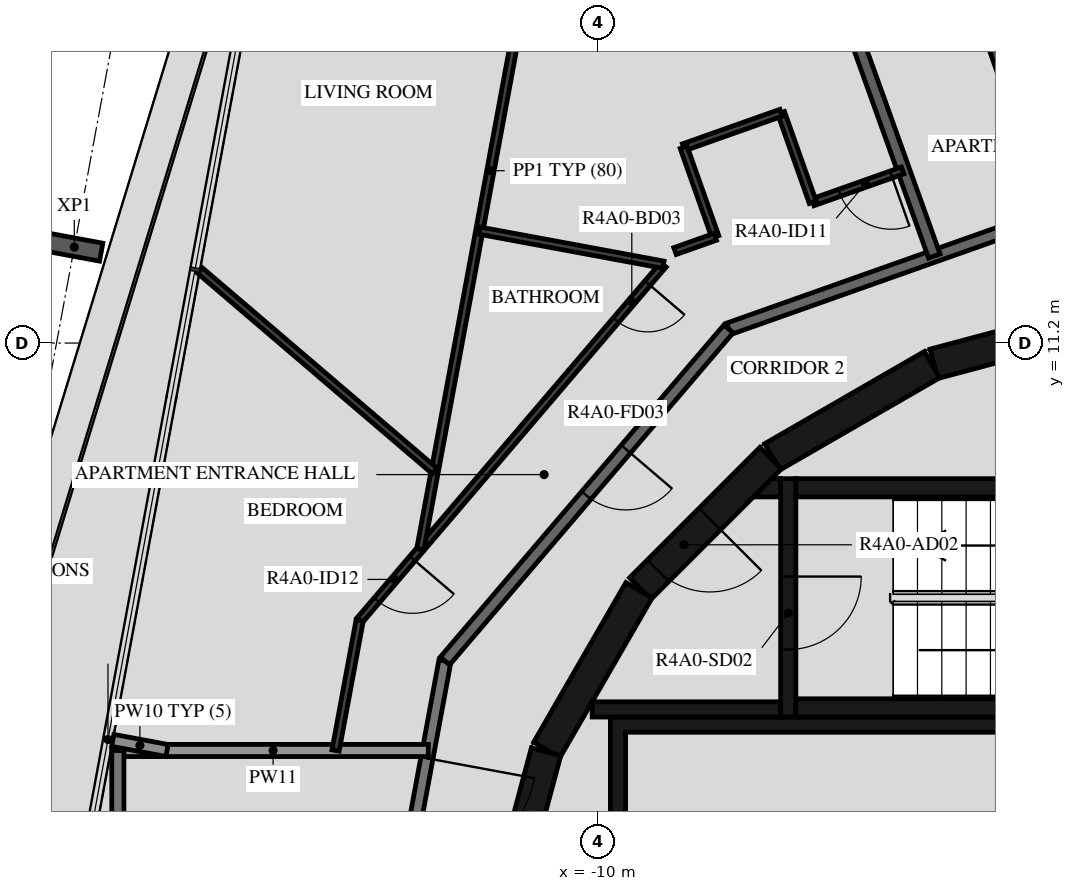
"""IFC4 building model, lengths in metres.
Left out: names, types, materials, properties, quantities, classifications, styles, units other than length and angle.
Written with IfcOpenShell. Run it as: python <this file> out.ifc"""

import sys

from ifc_helpers import new_model, si_unit, direction, frame, frame_2d, origin, origin_2d, place, context, subcontext, project, spatial, polyline, rectangle, i_section, outline, extrude, element, fill, save


model = new_model("IFC4")
c1 = context("Model", 3, precision=1e-05, world=origin(), true_north=direction((0.0, 1.0)))
c2 = subcontext(c1, "Body", "Model", "MODEL_VIEW")
j1 = project(units=[si_unit("LENGTHUNIT", "METRE"), si_unit("PLANEANGLEUNIT", "RADIAN")], contexts=[c1])
p1 = place(None, origin())
s1 = spatial("IfcSite", under=j1, at=p1, CompositionType="ELEMENT")
p2 = place(p1, origin())
s2 = spatial("IfcBuilding", under=s1, at=p2, CompositionType="ELEMENT")
p3 = place(p2, frame((0.0, 0.0, 151.7)))
s3 = spatial("IfcBuildingStorey", under=s2, at=p3, CompositionType="ELEMENT", Elevation=151.7)
p4 = place(p3, frame((-18.616, 12.777, -0.45), z_axis=(0.0, 0.0, 1.0), x_axis=(0.182235967681, 0.983254825609, 0.0)))
e1 = element("IfcColumn", 1, at=p4, inside=s3, PredefinedType="COLUMN", context=c2, shape_type="SweptSolid", body=[
    extrude(i_section(OverallWidth=0.3, OverallDepth=0.9, WebThickness=0.019, FlangeThickness=0.035, FilletRadius=0.03, at=origin_2d()), origin(), (0.0, 0.0, 1.0), 3.57),
])
for number, where, z_axis, x_axis in (
    (2, (-1.55, 11.643, 0.0), (0.0, 0.0, 1.0), (-0.966, -0.259, 0.0)),
    (3, (-4.51, 10.845, 0.0), (0.0, 0.0, 1.0), (-0.866, -0.5, 0.0)),
):
    element("IfcWall", number, at=place(p3, frame(where, z_axis=z_axis, x_axis=x_axis)), inside=s3, PredefinedType="SHEAR", context=c2, shape_type="SweptSolid", body=[
        extrude(rectangle(XDim=3.033, YDim=0.5, at=frame_2d((1.516, 0.0))), origin(), (0.0, 0.0, 1.0), 3.12),
    ])
p5 = place(p3, frame((-7.164, 9.308, 0.0), z_axis=(0.0, 0.0, 1.0), x_axis=(-0.707106781187, -0.707106781187, 0.0)))
e4 = element("IfcWall", 4, at=p5, inside=s3, PredefinedType="SHEAR", context=c2, shape_type="SweptSolid", body=[
    extrude(rectangle(XDim=3.032, YDim=0.5, at=frame_2d((1.516, 0.0))), origin(), (0.0, 0.0, 1.0), 3.12),
])
p6 = place(p5, frame((1.416, 0.0, 0.0)))
e5 = element("IfcOpeningElement", 5, at=p6, cuts=e4, PredefinedType="OPENING", context=c2, shape_type="SweptSolid", body=[
    extrude(rectangle(XDim=1.2, YDim=2.1, at=frame_2d((0.6, 1.05))), frame((0.0, 0.26, 0.0), z_axis=(0.0, -1.0, 0.0), x_axis=(1.0, 0.0, 0.0)), (0.0, 0.0, 1.0), 0.52),
])
for number, where, z_axis, x_axis in (
    (6, (-9.329, 7.137, 0.0), (0.0, 0.0, 1.0), (-0.5, -0.866, 0.0)),
    (7, (-10.858, 4.479, 0.0), (0.0, 0.0, 1.0), (-0.259, -0.966, 0.0)),
):
    element("IfcWall", number, at=place(p3, frame(where, z_axis=z_axis, x_axis=x_axis)), inside=s3, PredefinedType="SHEAR", context=c2, shape_type="SweptSolid", body=[
        extrude(rectangle(XDim=3.033, YDim=0.5, at=frame_2d((1.516, 0.0))), origin(), (0.0, 0.0, 1.0), 3.12),
    ])
for number, where, z_axis, x_axis in (
    (8, (-6.75, 5.2, 0.0), (0.0, 0.0, 1.0), (1.0, 0.0, 0.0)),
    (9, (-6.75, 8.82, 0.0), (0.0, 0.0, 1.0), (1.0, 0.0, 0.0)),
):
    element("IfcWall", number, at=place(p3, frame(where, z_axis=z_axis, x_axis=x_axis)), inside=s3, PredefinedType="SHEAR", context=c2, shape_type="SweptSolid", body=[
        extrude(rectangle(XDim=6.75, YDim=0.3, at=frame_2d((3.375, 0.0))), origin(), (0.0, 0.0, 1.0), 3.12),
    ])
p7 = place(p3, frame((-6.875, 8.97, 0.0), z_axis=(0.0, 0.0, 1.0), x_axis=(0.0, -1.0, 0.0)))
e10 = element("IfcWall", 10, at=p7, inside=s3, PredefinedType="SHEAR", context=c2, shape_type="SweptSolid", body=[
    extrude(rectangle(XDim=3.92, YDim=0.25, at=frame_2d((1.96, 0.0))), origin(), (0.0, 0.0, 1.0), 3.12),
])
p8 = place(p7, frame((1.61, 0.0, 0.0)))
e11 = element("IfcOpeningElement", 11, at=p8, cuts=e10, PredefinedType="OPENING", context=c2, shape_type="SweptSolid", body=[
    extrude(rectangle(XDim=1.2, YDim=2.1, at=frame_2d((0.6, 1.05))), frame((0.0, 0.135, 0.0), z_axis=(0.0, -1.0, 0.0), x_axis=(1.0, 0.0, 0.0)), (0.0, 0.0, 1.0), 0.27),
])
p9 = place(p3, frame((-7.0, 5.175, 0.0), z_axis=(0.0, 0.0, 1.0), x_axis=(-1.0, 0.0, 0.0)))
e12 = element("IfcWall", 12, at=p9, inside=s3, PredefinedType="SHEAR", context=c2, shape_type="SweptSolid", body=[
    extrude(rectangle(XDim=3.1, YDim=0.25, at=frame_2d((1.55, 0.0))), origin(), (0.0, 0.0, 1.0), 3.12),
])
p10 = place(p3, origin())
e13 = element("IfcWall", 13, at=p10, inside=s3, PredefinedType="SHEAR", context=c2, shape_type="SweptSolid", body=[
    extrude(outline(polyline([(-7.148, 8.97), (-7.0, 8.97), (-7.0, 8.67), (-7.448, 8.67), (-7.148, 8.97)])), origin(), (0.0, 0.0, 1.0), 3.12),
])
p11 = place(p3, origin())
e14 = element("IfcWall", 14, at=p11, inside=s3, PredefinedType="SHEAR", context=c2, shape_type="SweptSolid", body=[
    extrude(outline(polyline([(-9.55, 4.8), (-1.2, 4.8), (-1.2, 1.9), (-0.95, 1.9), (-0.95, 4.8), (0.95, 4.8), (0.95, 1.9), (1.2, 1.9), (1.2, 4.8), (3.1, 4.8), (3.1, 1.9), (3.35, 1.9), (3.35, 4.8), (5.25, 4.8), (5.25, 1.9), (5.5, 1.9), (5.5, 4.8), (7.4, 4.8), (7.4, 1.9), (7.65, 1.9), (7.65, 4.8), (9.55, 4.8), (9.55, 1.9), (9.8, 1.9), (9.8, 4.8), (9.8, 5.05), (-9.8, 5.05), (-9.8, 4.8), (-9.8, 1.9), (-9.55, 1.9), (-9.55, 4.8)])), origin(), (0.0, 0.0, 1.0), 3.12),
])
p12 = place(p3, frame((-12.521, 5.972, 0.0), z_axis=(0.0, 0.0, 1.0), x_axis=(-0.182251559718, -0.983251935661, 0.0)))
e15 = element("IfcWall", 15, at=p12, inside=s3, PredefinedType="STANDARD", context=c2, shape_type="SweptSolid", body=[
    extrude(rectangle(XDim=5.117, YDim=0.2, at=frame_2d((2.559, 0.0))), origin(), (0.0, 0.0, 1.0), 3.12),
])
p13 = place(p12, frame((1.627, 0.0, 0.0)))
e16 = element("IfcOpeningElement", 16, at=p13, cuts=e15, PredefinedType="OPENING", context=c2, shape_type="SweptSolid", body=[
    extrude(rectangle(XDim=1.8, YDim=2.1, at=frame_2d((0.9, 1.05))), frame((0.0, 0.11, 0.0), z_axis=(0.0, -1.0, 0.0), x_axis=(1.0, 0.0, 0.0)), (0.0, 0.0, 1.0), 0.22),
])
p14 = place(p3, frame((-2.359, 13.38, 0.0), z_axis=(0.0, 0.0, 1.0), x_axis=(-0.942647529236, -0.333789807551, 0.0)))
e17 = element("IfcWall", 17, at=p14, inside=s3, PredefinedType="STANDARD", context=c2, shape_type="SweptSolid", body=[
    extrude(rectangle(XDim=5.833, YDim=0.2, at=frame_2d((2.917, 0.0))), origin(), (0.0, 0.0, 1.0), 3.12),
])
p15 = place(p3, frame((-7.858, 11.433, 0.0), z_axis=(0.0, 0.0, 1.0), x_axis=(-0.649440801937, -0.760412154545, 0.0)))
e18 = element("IfcWall", 18, at=p15, inside=s3, PredefinedType="STANDARD", context=c2, shape_type="SweptSolid", body=[
    extrude(rectangle(XDim=7.181, YDim=0.2, at=frame_2d((3.59, 0.0))), origin(), (0.0, 0.0, 1.0), 3.12),
])
p16 = place(p15, frame((2.6, 0.0, 0.0)))
e19 = element("IfcOpeningElement", 19, at=p16, cuts=e18, PredefinedType="OPENING", context=c2, shape_type="SweptSolid", body=[
    extrude(rectangle(XDim=1.0, YDim=2.1, at=frame_2d((0.5, 1.05))), frame((0.0, 0.11, 0.0), z_axis=(0.0, -1.0, 0.0), x_axis=(1.0, 0.0, 0.0)), (0.0, 0.0, 1.0), 0.22),
])
p17 = place(p3, frame((-12.794, 4.5, 0.0), z_axis=(0.0, 0.0, 1.0), x_axis=(-1.0, 0.0, 0.0)))
e20 = element("IfcWall", 20, at=p17, inside=s3, PredefinedType="STANDARD", context=c2, shape_type="SweptSolid", body=[
    extrude(rectangle(XDim=5.106, YDim=0.2, at=frame_2d((2.553, 0.0))), origin(), (0.0, 0.0, 1.0), 2.73),
])
p18 = place(p3, frame((-17.9, 4.5, 0.0), z_axis=(0.0, 0.0, 1.0), x_axis=(0.0, -1.0, 0.0)))
e21 = element("IfcWall", 21, at=p18, inside=s3, PredefinedType="STANDARD", context=c2, shape_type="SweptSolid", body=[
    extrude(rectangle(XDim=9.0, YDim=0.2, at=frame_2d((4.5, 0.0))), origin(), (0.0, 0.0, 1.0), 3.12),
])
p19 = place(p3, frame((-6.185, 17.402, 0.0), z_axis=(0.0, 0.0, 1.0), x_axis=(0.337736730281, -0.941240618024, 0.0)))
e22 = element("IfcWall", 22, at=p19, inside=s3, PredefinedType="STANDARD", context=c2, shape_type="SweptSolid", body=[
    extrude(rectangle(XDim=5.068, YDim=0.2, at=frame_2d((2.534, 0.0))), origin(), (0.0, 0.0, 1.0), 3.12),
])
p20 = place(p3, frame((-17.984, 4.665, 0.0), z_axis=(0.0, 0.0, 1.0), x_axis=(0.98328378843, -0.182079629313, 0.0)))
e23 = element("IfcWall", 23, at=p20, inside=s3, PredefinedType="STANDARD", context=c2, shape_type="SweptSolid", body=[
    extrude(rectangle(XDim=0.908, YDim=0.2, at=frame_2d((0.454, 0.0))), origin(), (0.0, 0.0, 1.0), 2.73),
])
p21 = place(p3, frame((8.702, 12.206, 0.0), z_axis=(0.0, 0.0, 1.0), x_axis=(-0.760401313718, 0.649453494945, 0.0)))
e24 = element("IfcWall", 24, at=p21, inside=s3, PredefinedType="PARTITIONING", context=c2, shape_type="SweptSolid", body=[
    extrude(rectangle(XDim=16.724, YDim=0.12, at=frame_2d((8.362, 0.0))), origin(), (0.0, 0.0, 1.0), 3.12),
])
p22 = place(p21, frame((0.2, 0.0, 0.0)))
e25 = element("IfcOpeningElement", 25, at=p22, cuts=e24, PredefinedType="OPENING", context=c2, shape_type="SweptSolid", body=[
    extrude(rectangle(XDim=0.9, YDim=2.1, at=frame_2d((0.45, 1.05))), frame((0.0, 0.07, 0.0), z_axis=(0.0, -1.0, 0.0), x_axis=(1.0, 0.0, 0.0)), (0.0, 0.0, 1.0), 0.14),
])
p23 = place(p21, frame((7.099, 0.0, 0.0)))
e26 = element("IfcOpeningElement", 26, at=p23, cuts=e24, PredefinedType="OPENING", context=c2, shape_type="SweptSolid", body=[
    extrude(rectangle(XDim=0.9, YDim=2.1, at=frame_2d((0.45, 1.05))), frame((0.0, 0.07, 0.0), z_axis=(0.0, -1.0, 0.0), x_axis=(1.0, 0.0, 0.0)), (0.0, 0.0, 1.0), 0.14),
])
p24 = place(p3, frame((-3.048, 14.727, 0.0), z_axis=(0.0, 0.0, 1.0), x_axis=(-0.333811603187, 0.942639811157, 0.0)))
e27 = element("IfcWall", 27, at=p24, inside=s3, PredefinedType="PARTITIONING", context=c2, shape_type="SweptSolid", body=[
    extrude(rectangle(XDim=5.087, YDim=0.12, at=frame_2d((2.543, 0.0))), origin(), (0.0, 0.0, 1.0), 3.12),
])
p25 = place(p3, frame((-4.993, 14.038, 0.0), z_axis=(0.0, 0.0, 1.0), x_axis=(-0.942685371668, -0.333682918418, 0.0)))
e28 = element("IfcWall", 28, at=p25, inside=s3, PredefinedType="PARTITIONING", context=c2, shape_type="SweptSolid", body=[
    extrude(rectangle(XDim=1.569, YDim=0.12, at=frame_2d((0.784, 0.0))), origin(), (0.0, 0.0, 1.0), 3.12),
])
p26 = place(p25, frame((0.2, 0.0, 0.0)))
e29 = element("IfcOpeningElement", 29, at=p26, cuts=e28, PredefinedType="OPENING", context=c2, shape_type="SweptSolid", body=[
    extrude(rectangle(XDim=0.9, YDim=2.1, at=frame_2d((0.45, 1.05))), frame((0.0, 0.07, 0.0), z_axis=(0.0, -1.0, 0.0), x_axis=(1.0, 0.0, 0.0)), (0.0, 0.0, 1.0), 0.14),
])
p27 = place(p3, frame((-6.472, 13.515, 0.0), z_axis=(0.0, 0.0, 1.0), x_axis=(-0.333809516424, 0.942640550127, 0.0)))
e30 = element("IfcWall", 30, at=p27, inside=s3, PredefinedType="PARTITIONING", context=c2, shape_type="SweptSolid", body=[
    extrude(rectangle(XDim=1.562, YDim=0.12, at=frame_2d((0.781, 0.0))), origin(), (0.0, 0.0, 1.0), 3.12),
])
p28 = place(p3, frame((-6.993, 14.987, 0.0), z_axis=(0.0, 0.0, 1.0), x_axis=(-0.942599915297, -0.33392424243, 0.0)))
e31 = element("IfcWall", 31, at=p28, inside=s3, PredefinedType="PARTITIONING", context=c2, shape_type="SweptSolid", body=[
    extrude(rectangle(XDim=1.7, YDim=0.12, at=frame_2d((0.85, 0.0))), origin(), (0.0, 0.0, 1.0), 3.12),
])
p29 = place(p3, frame((-8.596, 14.419, 0.0), z_axis=(0.0, 0.0, 1.0), x_axis=(0.333670576497, -0.942689740254, 0.0)))
e32 = element("IfcWall", 32, at=p29, inside=s3, PredefinedType="PARTITIONING", context=c2, shape_type="SweptSolid", body=[
    extrude(rectangle(XDim=1.562, YDim=0.12, at=frame_2d((0.781, 0.0))), origin(), (0.0, 0.0, 1.0), 3.12),
])
p30 = place(p3, frame((-8.075, 12.947, 0.0), z_axis=(0.0, 0.0, 1.0), x_axis=(-0.942649994227, -0.33378284615, 0.0)))
e33 = element("IfcWall", 33, at=p30, inside=s3, PredefinedType="PARTITIONING", context=c2, shape_type="SweptSolid", body=[
    extrude(rectangle(XDim=0.703, YDim=0.12, at=frame_2d((0.352, 0.0))), origin(), (0.0, 0.0, 1.0), 3.12),
])
p31 = place(p3, frame((-8.929, 12.488, 0.0), z_axis=(0.0, 0.0, 1.0), x_axis=(-0.64944646045, -0.760407321775, 0.0)))
e34 = element("IfcWall", 34, at=p31, inside=s3, PredefinedType="PARTITIONING", context=c2, shape_type="SweptSolid", body=[
    extrude(rectangle(XDim=7.69, YDim=0.12, at=frame_2d((3.845, 0.0))), origin(), (0.0, 0.0, 1.0), 3.12),
])
p32 = place(p31, frame((0.4, 0.0, 0.0)))
e35 = element("IfcOpeningElement", 35, at=p32, cuts=e34, PredefinedType="OPENING", context=c2, shape_type="SweptSolid", body=[
    extrude(rectangle(XDim=0.8, YDim=2.1, at=frame_2d((0.4, 1.05))), frame((0.0, 0.07, 0.0), z_axis=(0.0, -1.0, 0.0), x_axis=(1.0, 0.0, 0.0)), (0.0, 0.0, 1.0), 0.14),
])
p33 = place(p31, frame((6.356, 0.0, 0.0)))
e36 = element("IfcOpeningElement", 36, at=p33, cuts=e34, PredefinedType="OPENING", context=c2, shape_type="SweptSolid", body=[
    extrude(rectangle(XDim=0.9, YDim=2.1, at=frame_2d((0.45, 1.05))), frame((0.0, 0.07, 0.0), z_axis=(0.0, -1.0, 0.0), x_axis=(1.0, 0.0, 0.0)), (0.0, 0.0, 1.0), 0.14),
])
p34 = place(p3, frame((-13.923, 6.641, 0.0), z_axis=(0.0, 0.0, 1.0), x_axis=(-0.182209715759, -0.983259690765, 0.0)))
e37 = element("IfcWall", 37, at=p34, inside=s3, PredefinedType="PARTITIONING", context=c2, shape_type="SweptSolid", body=[
    extrude(rectangle(XDim=2.177, YDim=0.12, at=frame_2d((1.089, 0.0))), origin(), (0.0, 0.0, 1.0), 3.12),
])
p35 = place(p3, frame((-10.618, 20.262, 0.0), z_axis=(0.0, 0.0, 1.0), x_axis=(-0.182222468274, -0.983257327487, 0.0)))
e38 = element("IfcWall", 38, at=p35, inside=s3, PredefinedType="PARTITIONING", context=c2, shape_type="SweptSolid", body=[
    extrude(rectangle(XDim=12.667, YDim=0.12, at=frame_2d((6.333, 0.0))), origin(), (0.0, 0.0, 1.0), 3.12),
])
p36 = place(p35, frame((2.57, 0.0, 0.0)))
e39 = element("IfcOpeningElement", 39, at=p36, cuts=e38, PredefinedType="OPENING", context=c2, shape_type="SweptSolid", body=[
    extrude(rectangle(XDim=0.9, YDim=2.1, at=frame_2d((0.45, 1.05))), frame((0.0, 0.07, 0.0), z_axis=(0.0, -1.0, 0.0), x_axis=(1.0, 0.0, 0.0)), (0.0, 0.0, 1.0), 0.14),
])
p37 = place(p3, frame((-11.955, 13.049, 0.0), z_axis=(0.0, 0.0, 1.0), x_axis=(0.983247271586, -0.182276720725, 0.0)))
e40 = element("IfcWall", 40, at=p37, inside=s3, PredefinedType="PARTITIONING", context=c2, shape_type="SweptSolid", body=[
    extrude(rectangle(XDim=3.078, YDim=0.12, at=frame_2d((1.539, 0.0))), origin(), (0.0, 0.0, 1.0), 3.12),
])
p38 = place(p3, frame((-16.552, 12.394, 0.0), z_axis=(0.0, 0.0, 1.0), x_axis=(0.760425586578, -0.649425074414, 0.0)))
e41 = element("IfcWall", 41, at=p38, inside=s3, PredefinedType="PARTITIONING", context=c2, shape_type="SweptSolid", body=[
    extrude(rectangle(XDim=5.081, YDim=0.12, at=frame_2d((2.541, 0.0))), origin(), (0.0, 0.0, 1.0), 3.12),
])
p39 = place(p8, origin())
e42 = element("IfcDoor", 42, at=p39, inside=s3, OperationType="SINGLE_SWING_LEFT", PredefinedType="DOOR", context=c2, shape_type="SweptSolid", body=[
    extrude(rectangle(XDim=1.2, YDim=2.1, at=frame_2d((0.6, 1.05))), frame((0.0, 0.025, 0.0), z_axis=(0.0, -1.0, 0.0), x_axis=(1.0, 0.0, 0.0)), (0.0, 0.0, 1.0), 0.05),
])
fill(e11, e42)
p40 = place(p6, origin())
e43 = element("IfcDoor", 43, at=p40, inside=s3, OperationType="SINGLE_SWING_RIGHT", PredefinedType="DOOR", context=c2, shape_type="SweptSolid", body=[
    extrude(rectangle(XDim=1.2, YDim=2.1, at=frame_2d((0.6, 1.05))), frame((0.0, 0.025, 0.0), z_axis=(0.0, -1.0, 0.0), x_axis=(1.0, 0.0, 0.0)), (0.0, 0.0, 1.0), 0.05),
])
fill(e5, e43)
p41 = place(p16, origin())
e44 = element("IfcDoor", 44, at=p41, inside=s3, OperationType="SINGLE_SWING_LEFT", PredefinedType="DOOR", context=c2, shape_type="SweptSolid", body=[
    extrude(rectangle(XDim=1.0, YDim=2.1, at=frame_2d((0.5, 1.05))), frame((0.0, 0.025, 0.0), z_axis=(0.0, -1.0, 0.0), x_axis=(1.0, 0.0, 0.0)), (0.0, 0.0, 1.0), 0.05),
])
fill(e19, e44)
p42 = place(p26, origin())
e45 = element("IfcDoor", 45, at=p42, inside=s3, OperationType="SINGLE_SWING_LEFT", PredefinedType="DOOR", context=c2, shape_type="SweptSolid", body=[
    extrude(rectangle(XDim=0.9, YDim=2.1, at=frame_2d((0.45, 1.05))), frame((0.0, 0.025, 0.0), z_axis=(0.0, -1.0, 0.0), x_axis=(1.0, 0.0, 0.0)), (0.0, 0.0, 1.0), 0.05),
])
fill(e29, e45)
p43 = place(p32, origin())
e46 = element("IfcDoor", 46, at=p43, inside=s3, OperationType="SINGLE_SWING_LEFT", PredefinedType="DOOR", context=c2, shape_type="SweptSolid", body=[
    extrude(rectangle(XDim=0.8, YDim=2.1, at=frame_2d((0.4, 1.05))), frame((0.0, 0.025, 0.0), z_axis=(0.0, -1.0, 0.0), x_axis=(1.0, 0.0, 0.0)), (0.0, 0.0, 1.0), 0.05),
])
fill(e35, e46)
p44 = place(p33, origin())
e47 = element("IfcDoor", 47, at=p44, inside=s3, OperationType="SINGLE_SWING_LEFT", PredefinedType="DOOR", context=c2, shape_type="SweptSolid", body=[
    extrude(rectangle(XDim=0.9, YDim=2.1, at=frame_2d((0.45, 1.05))), frame((0.0, 0.025, 0.0), z_axis=(0.0, -1.0, 0.0), x_axis=(1.0, 0.0, 0.0)), (0.0, 0.0, 1.0), 0.05),
])
fill(e36, e47)
p45 = place(p13, origin())
e48 = element("IfcDoor", 48, at=p45, inside=s3, OperationType="DOUBLE_DOOR_SINGLE_SWING", PredefinedType="DOOR", context=c2, shape_type="SweptSolid", body=[
    extrude(rectangle(XDim=1.8, YDim=2.1, at=frame_2d((0.9, 1.05))), frame((0.0, 0.025, 0.0), z_axis=(0.0, -1.0, 0.0), x_axis=(1.0, 0.0, 0.0)), (0.0, 0.0, 1.0), 0.05),
])
fill(e16, e48)
save(model, sys.argv[1])
